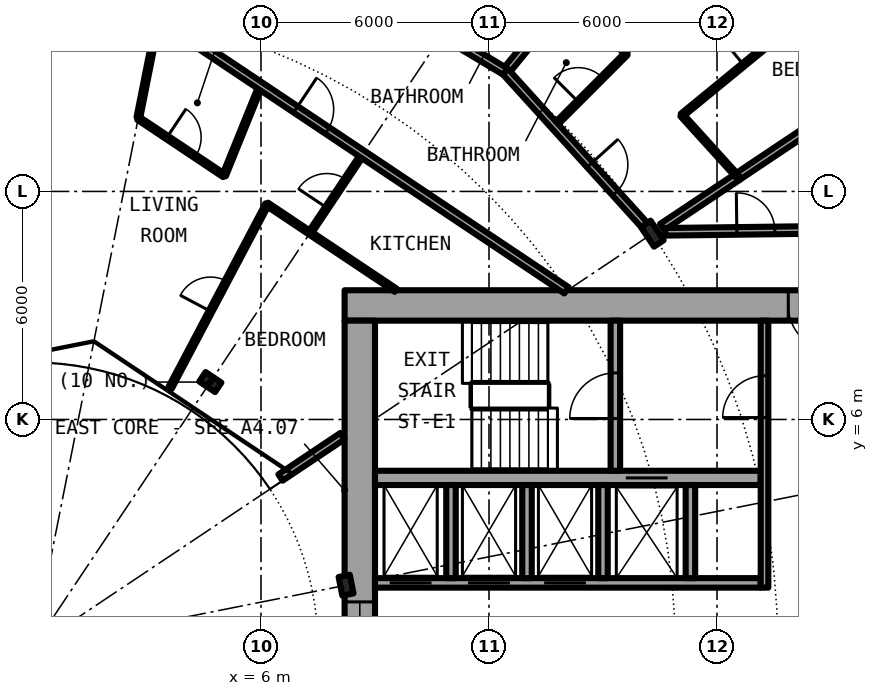
"""IFC4 building model, lengths in metres.
Left out: names, types, materials, properties, quantities, classifications, styles, units other than length and angle.
Written with IfcOpenShell. Run it as: python <this file> out.ifc"""

import sys

from ifc_helpers import new_model, si_unit, direction, frame, frame_2d, origin, origin_2d, place, context, subcontext, project, spatial, rectangle, i_section, extrude, element, fill, save


model = new_model("IFC4")
c1 = context("Model", 3, precision=1e-05, world=origin(), true_north=direction((0.0, 1.0)))
c2 = subcontext(c1, "Body", "Model", "MODEL_VIEW")
j1 = project(units=[si_unit("LENGTHUNIT", "METRE"), si_unit("PLANEANGLEUNIT", "RADIAN")], contexts=[c1])
p1 = place(None, origin())
s1 = spatial("IfcSite", under=j1, at=p1, CompositionType="ELEMENT")
p2 = place(p1, origin())
s2 = spatial("IfcBuilding", under=s1, at=p2, CompositionType="ELEMENT")
p3 = place(p2, frame((0.0, 0.0, 28.9)))
s3 = spatial("IfcBuildingStorey", under=s2, at=p3, CompositionType="ELEMENT", Elevation=28.9)
p4 = place(p3, frame((16.297, 10.889, 0.0), z_axis=(0.0, 0.0, 1.0), x_axis=(0.831469612303, 0.55557023302, 0.0)))
e1 = element("IfcColumn", 1, at=p4, inside=s3, PredefinedType="COLUMN", context=c2, shape_type="SweptSolid", body=[
    extrude(i_section(OverallWidth=0.305, OverallDepth=0.62, WebThickness=0.021, FlangeThickness=0.04, FilletRadius=0.027, at=origin_2d()), origin(), (0.0, 0.0, 1.0), 3.05),
])
for number, where, z_axis, x_axis in (
    (2, (8.239, 1.639, 0.0), (0.0, 0.0, 1.0), (0.981, 0.195, 0.0)),
    (3, (4.667, 6.984, 0.0), (0.0, 0.0, 1.0), (0.556, 0.831, 0.0)),
):
    element("IfcColumn", number, at=place(p3, frame(where, z_axis=z_axis, x_axis=x_axis)), inside=s3, PredefinedType="COLUMN", context=c2, shape_type="SweptSolid", body=[
        extrude(i_section(OverallWidth=0.3, OverallDepth=0.5, WebThickness=0.014, FlangeThickness=0.028, FilletRadius=0.027, at=origin_2d()), origin(), (0.0, 0.0, 1.0), 3.05),
    ])
p5 = place(p3, frame((22.699, 15.167, 0.0), z_axis=(0.0, 0.0, 1.0), x_axis=(-0.634382322723, 0.773019449054, 0.0)))
e4 = element("IfcWall", 4, at=p5, inside=s3, PredefinedType="SOLIDWALL", context=c2, shape_type="SweptSolid", body=[
    extrude(rectangle(XDim=5.352, YDim=0.25, at=frame_2d((2.676, 0.0))), origin(), (0.0, 0.0, 1.0), 2.7),
])
p6 = place(p5, frame((0.441, 0.0, 0.3)))
e5 = element("IfcOpeningElement", 5, at=p6, cuts=e4, PredefinedType="OPENING", context=c2, shape_type="SweptSolid", body=[
    extrude(rectangle(XDim=1.8, YDim=2.1, at=frame_2d((0.9, 1.05))), frame((0.0, 0.135, 0.0), z_axis=(0.0, -1.0, 0.0), x_axis=(1.0, 0.0, 0.0)), (0.0, 0.0, 1.0), 0.27),
])
p7 = place(p5, frame((3.51, 0.0, 0.0)))
e6 = element("IfcOpeningElement", 6, at=p7, cuts=e4, PredefinedType="OPENING", context=c2, shape_type="SweptSolid", body=[
    extrude(rectangle(XDim=1.0, YDim=2.2, at=frame_2d((0.5, 1.1))), frame((0.0, 0.135, 0.0), z_axis=(0.0, -1.0, 0.0), x_axis=(1.0, 0.0, 0.0)), (0.0, 0.0, 1.0), 0.27),
])
p8 = place(p3, frame((22.4, 9.0, 0.0), z_axis=(0.0, 0.0, 1.0), x_axis=(-1.0, 0.0, 0.0)))
e7 = element("IfcWall", 7, at=p8, inside=s3, PredefinedType="SHEAR", context=c2, shape_type="SweptSolid", body=[
    extrude(rectangle(XDim=14.2, YDim=0.8, at=frame_2d((7.1, 0.0))), origin(), (0.0, 0.0, 1.0), 3.05),
])
p9 = place(p8, frame((1.325, 0.0, 0.0)))
e8 = element("IfcOpeningElement", 8, at=p9, cuts=e7, PredefinedType="OPENING", context=c2, shape_type="SweptSolid", body=[
    extrude(rectangle(XDim=1.2, YDim=2.3, at=frame_2d((0.6, 1.15))), frame((0.0, 0.41, 0.0), z_axis=(0.0, -1.0, 0.0), x_axis=(1.0, 0.0, 0.0)), (0.0, 0.0, 1.0), 0.82),
])
p10 = place(p3, frame((8.6, -8.6, 0.0), z_axis=(0.0, 0.0, 1.0), x_axis=(0.0, 1.0, 0.0)))
e9 = element("IfcWall", 9, at=p10, inside=s3, PredefinedType="SHEAR", context=c2, shape_type="SweptSolid", body=[
    extrude(rectangle(XDim=17.2, YDim=0.8, at=frame_2d((8.6, 0.0))), origin(), (0.0, 0.0, 1.0), 3.05),
])
p11 = place(p10, frame((7.4, 0.0, 0.1)))
e10 = element("IfcOpeningElement", 10, at=p11, cuts=e9, PredefinedType="OPENING", context=c2, shape_type="SweptSolid", body=[
    extrude(rectangle(XDim=2.4, YDim=2.2, at=frame_2d((1.2, 1.1))), frame((0.0, 0.41, 0.0), z_axis=(0.0, -1.0, 0.0), x_axis=(1.0, 0.0, 0.0)), (0.0, 0.0, 1.0), 0.82),
])
p12 = place(p3, frame((9.0, 1.7, 0.0), z_axis=(0.0, 0.0, 1.0), x_axis=(1.0, 0.0, 0.0)))
e11 = element("IfcWall", 11, at=p12, inside=s3, PredefinedType="SHEAR", context=c2, shape_type="SweptSolid", body=[
    extrude(rectangle(XDim=10.15, YDim=0.25, at=frame_2d((5.075, 0.0))), origin(), (0.0, 0.0, 1.0), 3.05),
])
p13 = place(p12, frame((0.387, 0.0, 0.0)))
e12 = element("IfcOpeningElement", 12, at=p13, cuts=e11, PredefinedType="OPENING", context=c2, shape_type="SweptSolid", body=[
    extrude(rectangle(XDim=1.1, YDim=2.3, at=frame_2d((0.55, 1.15))), frame((0.0, 0.135, 0.0), z_axis=(0.0, -1.0, 0.0), x_axis=(1.0, 0.0, 0.0)), (0.0, 0.0, 1.0), 0.27),
])
p14 = place(p12, frame((2.45, 0.0, 0.0)))
e13 = element("IfcOpeningElement", 13, at=p14, cuts=e11, PredefinedType="OPENING", context=c2, shape_type="SweptSolid", body=[
    extrude(rectangle(XDim=1.1, YDim=2.3, at=frame_2d((0.55, 1.15))), frame((0.0, 0.135, 0.0), z_axis=(0.0, -1.0, 0.0), x_axis=(1.0, 0.0, 0.0)), (0.0, 0.0, 1.0), 0.27),
])
p15 = place(p12, frame((4.45, 0.0, 0.0)))
e14 = element("IfcOpeningElement", 14, at=p15, cuts=e11, PredefinedType="OPENING", context=c2, shape_type="SweptSolid", body=[
    extrude(rectangle(XDim=1.1, YDim=2.3, at=frame_2d((0.55, 1.15))), frame((0.0, 0.135, 0.0), z_axis=(0.0, -1.0, 0.0), x_axis=(1.0, 0.0, 0.0)), (0.0, 0.0, 1.0), 0.27),
])
p16 = place(p3, frame((9.0, 4.462, 0.0), z_axis=(0.0, 0.0, 1.0), x_axis=(1.0, 0.0, 0.0)))
e15 = element("IfcWall", 15, at=p16, inside=s3, PredefinedType="SHEAR", context=c2, shape_type="SweptSolid", body=[
    extrude(rectangle(XDim=10.15, YDim=0.375, at=frame_2d((5.075, 0.0))), origin(), (0.0, 0.0, 1.0), 3.05),
])
p17 = place(p16, frame((6.6, 0.0, 0.0)))
e16 = element("IfcOpeningElement", 16, at=p17, cuts=e15, PredefinedType="OPENING", context=c2, shape_type="SweptSolid", body=[
    extrude(rectangle(XDim=1.1, YDim=2.3, at=frame_2d((0.55, 1.15))), frame((0.0, 0.198, 0.0), z_axis=(0.0, -1.0, 0.0), x_axis=(1.0, 0.0, 0.0)), (0.0, 0.0, 1.0), 0.395),
])
p18 = place(p3, frame((15.325, 4.65, 0.0), z_axis=(0.0, 0.0, 1.0), x_axis=(0.0, 1.0, 0.0)))
e17 = element("IfcWall", 17, at=p18, inside=s3, PredefinedType="SHEAR", context=c2, shape_type="SweptSolid", body=[
    extrude(rectangle(XDim=3.95, YDim=0.25, at=frame_2d((1.975, 0.0))), origin(), (0.0, 0.0, 1.0), 3.05),
])
p19 = place(p18, frame((1.375, 0.0, 0.0)))
e18 = element("IfcOpeningElement", 18, at=p19, cuts=e17, PredefinedType="OPENING", context=c2, shape_type="SweptSolid", body=[
    extrude(rectangle(XDim=1.2, YDim=2.3, at=frame_2d((0.6, 1.15))), frame((0.0, 0.135, 0.0), z_axis=(0.0, -1.0, 0.0), x_axis=(1.0, 0.0, 0.0)), (0.0, 0.0, 1.0), 0.27),
])
for number, where, z_axis, x_axis in (
    (19, (15.0, 1.825, 0.0), (0.0, 0.0, 1.0), (0.0, 1.0, 0.0)),
    (20, (17.3, 1.825, 0.0), (0.0, 0.0, 1.0), (0.0, 1.0, 0.0)),
):
    element("IfcWall", number, at=place(p3, frame(where, z_axis=z_axis, x_axis=x_axis)), inside=s3, PredefinedType="SOLIDWALL", context=c2, shape_type="SweptSolid", body=[
        extrude(rectangle(XDim=2.45, YDim=0.25, at=frame_2d((1.225, 0.0))), origin(), (0.0, 0.0, 1.0), 2.7),
    ])
p20 = place(p3, frame((19.25, 1.575, 0.0), z_axis=(0.0, 0.0, 1.0), x_axis=(0.0, 1.0, 0.0)))
e21 = element("IfcWall", 21, at=p20, inside=s3, PredefinedType="SOLIDWALL", context=c2, shape_type="SweptSolid", body=[
    extrude(rectangle(XDim=7.025, YDim=0.2, at=frame_2d((3.513, 0.0))), origin(), (0.0, 0.0, 1.0), 2.7),
])
p21 = place(p20, frame((4.475, 0.0, 0.0)))
e22 = element("IfcOpeningElement", 22, at=p21, cuts=e21, PredefinedType="OPENING", context=c2, shape_type="SweptSolid", body=[
    extrude(rectangle(XDim=1.1, YDim=2.3, at=frame_2d((0.55, 1.15))), frame((0.0, 0.11, 0.0), z_axis=(0.0, -1.0, 0.0), x_axis=(1.0, 0.0, 0.0)), (0.0, 0.0, 1.0), 0.22),
])
for number, where, z_axis, x_axis in (
    (23, (11.0, 1.825, 0.0), (0.0, 0.0, 1.0), (0.0, 1.0, 0.0)),
    (24, (13.0, 1.825, 0.0), (0.0, 0.0, 1.0), (0.0, 1.0, 0.0)),
):
    element("IfcWall", number, at=place(p3, frame(where, z_axis=z_axis, x_axis=x_axis)), inside=s3, PredefinedType="SOLIDWALL", context=c2, shape_type="SweptSolid", body=[
        extrude(rectangle(XDim=2.45, YDim=0.25, at=frame_2d((1.225, 0.0))), origin(), (0.0, 0.0, 1.0), 2.7),
    ])
p22 = place(p3, frame((3.606, 6.827, 0.0), z_axis=(0.0, 0.0, 1.0), x_axis=(0.466976820365, 0.884269556889, 0.0)))
e25 = element("IfcWall", 25, at=p22, inside=s3, PredefinedType="PARTITIONING", context=c2, shape_type="SweptSolid", body=[
    extrude(rectangle(XDim=5.469, YDim=0.1, at=frame_2d((2.735, 0.0))), origin(), (0.0, 0.0, 1.0), 2.7),
])
p23 = place(p22, frame((2.284, 0.0, 0.0)))
e26 = element("IfcOpeningElement", 26, at=p23, cuts=e25, PredefinedType="OPENING", context=c2, shape_type="SweptSolid", body=[
    extrude(rectangle(XDim=0.9, YDim=2.3, at=frame_2d((0.45, 1.15))), frame((0.0, 0.06, 0.0), z_axis=(0.0, -1.0, 0.0), x_axis=(1.0, 0.0, 0.0)), (0.0, 0.0, 1.0), 0.12),
])
p24 = place(p3, frame((5.029, 12.418, 0.0), z_axis=(0.0, 0.0, 1.0), x_axis=(0.375649498413, 0.926761811008, 0.0)))
e27 = element("IfcWall", 27, at=p24, inside=s3, PredefinedType="PARTITIONING", context=c2, shape_type="SweptSolid", body=[
    extrude(rectangle(XDim=2.548, YDim=0.1, at=frame_2d((1.274, 0.0))), origin(), (0.0, 0.0, 1.0), 2.7),
])
p25 = place(p3, frame((7.289, 10.908, 0.0), z_axis=(0.0, 0.0, 1.0), x_axis=(0.555355163998, 0.831613276602, 0.0)))
e28 = element("IfcWall", 28, at=p25, inside=s3, PredefinedType="PARTITIONING", context=c2, shape_type="SweptSolid", body=[
    extrude(rectangle(XDim=2.494, YDim=0.1, at=frame_2d((1.247, 0.0))), origin(), (0.0, 0.0, 1.0), 2.7),
])
p26 = place(p25, frame((0.797, 0.0, 0.0)))
e29 = element("IfcOpeningElement", 29, at=p26, cuts=e28, PredefinedType="OPENING", context=c2, shape_type="SweptSolid", body=[
    extrude(rectangle(XDim=0.9, YDim=2.3, at=frame_2d((0.45, 1.15))), frame((0.0, 0.06, 0.0), z_axis=(0.0, -1.0, 0.0), x_axis=(1.0, 0.0, 0.0)), (0.0, 0.0, 1.0), 0.12),
])
p27 = place(p3, frame((12.434, 15.151, 0.0), z_axis=(0.0, 0.0, 1.0), x_axis=(0.634381303318, 0.773020285633, 0.0)))
e30 = element("IfcWall", 30, at=p27, inside=s3, PredefinedType="PARTITIONING", context=c2, shape_type="SweptSolid", body=[
    extrude(rectangle(XDim=7.576, YDim=0.2, at=frame_2d((3.788, 0.0))), origin(), (0.0, 0.0, 1.0), 2.7),
])
p28 = place(p3, frame((13.722, 13.73, 0.0), z_axis=(0.0, 0.0, 1.0), x_axis=(0.706741540154, 0.707471833659, 0.0)))
e31 = element("IfcWall", 31, at=p28, inside=s3, PredefinedType="PARTITIONING", context=c2, shape_type="SweptSolid", body=[
    extrude(rectangle(XDim=2.674, YDim=0.1, at=frame_2d((1.337, 0.0))), origin(), (0.0, 0.0, 1.0), 2.7),
])
p29 = place(p28, frame((0.887, 0.0, 0.0)))
e32 = element("IfcOpeningElement", 32, at=p29, cuts=e31, PredefinedType="OPENING", context=c2, shape_type="SweptSolid", body=[
    extrude(rectangle(XDim=0.9, YDim=2.3, at=frame_2d((0.45, 1.15))), frame((0.0, 0.06, 0.0), z_axis=(0.0, -1.0, 0.0), x_axis=(1.0, 0.0, 0.0)), (0.0, 0.0, 1.0), 0.12),
])
p30 = place(p3, frame((17.077, 14.006, 0.0), z_axis=(0.0, 0.0, 1.0), x_axis=(0.77326214499, 0.634086472908, 0.0)))
e33 = element("IfcWall", 33, at=p30, inside=s3, PredefinedType="PARTITIONING", context=c2, shape_type="SweptSolid", body=[
    extrude(rectangle(XDim=5.089, YDim=0.1, at=frame_2d((2.544, 0.0))), origin(), (0.0, 0.0, 1.0), 2.7),
])
p31 = place(p30, frame((2.094, 0.0, 0.0)))
e34 = element("IfcOpeningElement", 34, at=p31, cuts=e33, PredefinedType="OPENING", context=c2, shape_type="SweptSolid", body=[
    extrude(rectangle(XDim=0.9, YDim=2.3, at=frame_2d((0.45, 1.15))), frame((0.0, 0.06, 0.0), z_axis=(0.0, -1.0, 0.0), x_axis=(1.0, 0.0, 0.0)), (0.0, 0.0, 1.0), 0.12),
])
p32 = place(p3, frame((18.542, 12.389, 0.0), z_axis=(0.0, 0.0, 1.0), x_axis=(0.831387096605, 0.55569370664, 0.0)))
e35 = element("IfcWall", 35, at=p32, inside=s3, PredefinedType="PARTITIONING", context=c2, shape_type="SweptSolid", body=[
    extrude(rectangle(XDim=4.875, YDim=0.2, at=frame_2d((2.438, 0.0))), origin(), (0.0, 0.0, 1.0), 2.7),
])
p33 = place(p3, frame((16.555, 11.061, 0.0), z_axis=(0.0, 0.0, 1.0), x_axis=(0.832066006555, 0.554676627176, 0.0)))
e36 = element("IfcWall", 36, at=p33, inside=s3, PredefinedType="PARTITIONING", context=c2, shape_type="SweptSolid", body=[
    extrude(rectangle(XDim=2.39, YDim=0.2, at=frame_2d((1.195, 0.0))), origin(), (0.0, 0.0, 1.0), 2.7),
])
p34 = place(p3, frame((6.513, 4.472, 0.0), z_axis=(0.0, 0.0, 1.0), x_axis=(0.831417956244, 0.555647533996, 0.0)))
e37 = element("IfcWall", 37, at=p34, inside=s3, PredefinedType="PARTITIONING", context=c2, shape_type="SweptSolid", body=[
    extrude(rectangle(XDim=1.962, YDim=0.2, at=frame_2d((0.981, 0.0))), origin(), (0.0, 0.0, 1.0), 2.7),
])
p35 = place(p3, frame((16.637, 10.938, 0.0), z_axis=(0.0, 0.0, 1.0), x_axis=(0.99992425795, 0.012307654658, 0.0)))
e38 = element("IfcWall", 38, at=p35, inside=s3, PredefinedType="PARTITIONING", context=c2, shape_type="SweptSolid", body=[
    extrude(rectangle(XDim=5.039, YDim=0.2, at=frame_2d((2.519, 0.0))), origin(), (0.0, 0.0, 1.0), 2.7),
])
p36 = place(p35, frame((1.884, 0.0, 0.0)))
e39 = element("IfcOpeningElement", 39, at=p36, cuts=e38, PredefinedType="OPENING", context=c2, shape_type="SweptSolid", body=[
    extrude(rectangle(XDim=1.0, YDim=2.3, at=frame_2d((0.5, 1.15))), frame((0.0, 0.11, 0.0), z_axis=(0.0, -1.0, 0.0), x_axis=(1.0, 0.0, 0.0)), (0.0, 0.0, 1.0), 0.22),
])
p37 = place(p3, frame((2.771, 13.926, 0.0), z_axis=(0.0, 0.0, 1.0), x_axis=(0.831538390496, -0.555467285384, 0.0)))
e40 = element("IfcWall", 40, at=p37, inside=s3, PredefinedType="PARTITIONING", context=c2, shape_type="SweptSolid", body=[
    extrude(rectangle(XDim=2.717, YDim=0.1, at=frame_2d((1.358, 0.0))), origin(), (0.0, 0.0, 1.0), 2.7),
])
p38 = place(p37, frame((0.907, 0.0, 0.0)))
e41 = element("IfcOpeningElement", 41, at=p38, cuts=e40, PredefinedType="OPENING", context=c2, shape_type="SweptSolid", body=[
    extrude(rectangle(XDim=0.9, YDim=2.3, at=frame_2d((0.45, 1.15))), frame((0.0, 0.06, 0.0), z_axis=(0.0, -1.0, 0.0), x_axis=(1.0, 0.0, 0.0)), (0.0, 0.0, 1.0), 0.12),
])
p39 = place(p3, frame((6.159, 11.663, 0.0), z_axis=(0.0, 0.0, 1.0), x_axis=(0.831459707426, -0.555585056429, 0.0)))
e42 = element("IfcWall", 42, at=p39, inside=s3, PredefinedType="PARTITIONING", context=c2, shape_type="SweptSolid", body=[
    extrude(rectangle(XDim=4.073, YDim=0.1, at=frame_2d((2.037, 0.0))), origin(), (0.0, 0.0, 1.0), 2.7),
])
p40 = place(p3, frame((3.299, 16.574, 0.0), z_axis=(0.0, 0.0, 1.0), x_axis=(0.831465254975, -0.555576754166, 0.0)))
e43 = element("IfcWall", 43, at=p40, inside=s3, PredefinedType="PARTITIONING", context=c2, shape_type="SweptSolid", body=[
    extrude(rectangle(XDim=12.915, YDim=0.2, at=frame_2d((6.457, 0.0))), origin(), (0.0, 0.0, 1.0), 2.7),
])
p41 = place(p40, frame((4.346, 0.0, 0.0)))
e44 = element("IfcOpeningElement", 44, at=p41, cuts=e43, PredefinedType="OPENING", context=c2, shape_type="SweptSolid", body=[
    extrude(rectangle(XDim=1.0, YDim=2.3, at=frame_2d((0.5, 1.15))), frame((0.0, 0.11, 0.0), z_axis=(0.0, -1.0, 0.0), x_axis=(1.0, 0.0, 0.0)), (0.0, 0.0, 1.0), 0.22),
])
p42 = place(p3, frame((10.915, 16.061, 0.0), z_axis=(0.0, 0.0, 1.0), x_axis=(0.857809047014, -0.513968519329, 0.0)))
e45 = element("IfcWall", 45, at=p42, inside=s3, PredefinedType="PARTITIONING", context=c2, shape_type="SweptSolid", body=[
    extrude(rectangle(XDim=1.771, YDim=0.2, at=frame_2d((0.885, 0.0))), origin(), (0.0, 0.0, 1.0), 2.38),
])
p43 = place(p3, frame((12.434, 15.151, 0.0), z_axis=(0.0, 0.0, 1.0), x_axis=(0.671514934772, -0.740991020444, 0.0)))
e46 = element("IfcWall", 46, at=p43, inside=s3, PredefinedType="PARTITIONING", context=c2, shape_type="SweptSolid", body=[
    extrude(rectangle(XDim=5.598, YDim=0.2, at=frame_2d((2.799, 0.0))), origin(), (0.0, 0.0, 1.0), 2.38),
])
p44 = place(p43, frame((3.305, 0.0, 0.0)))
e47 = element("IfcOpeningElement", 47, at=p44, cuts=e46, PredefinedType="OPENING", context=c2, shape_type="SweptSolid", body=[
    extrude(rectangle(XDim=1.0, YDim=2.3, at=frame_2d((0.5, 1.15))), frame((0.0, 0.11, 0.0), z_axis=(0.0, -1.0, 0.0), x_axis=(1.0, 0.0, 0.0)), (0.0, 0.0, 1.0), 0.22),
])
p45 = place(p3, frame((14.147, 17.238, 0.0), z_axis=(0.0, 0.0, 1.0), x_axis=(0.671674967707, -0.740845960882, 0.0)))
e48 = element("IfcWall", 48, at=p45, inside=s3, PredefinedType="PARTITIONING", context=c2, shape_type="SweptSolid", body=[
    extrude(rectangle(XDim=2.181, YDim=0.1, at=frame_2d((1.091, 0.0))), origin(), (0.0, 0.0, 1.0), 2.7),
])
p46 = place(p3, frame((17.072, 14.011, 0.0), z_axis=(0.0, 0.0, 1.0), x_axis=(0.67169789574, -0.740825172937, 0.0)))
e49 = element("IfcWall", 49, at=p46, inside=s3, PredefinedType="PARTITIONING", context=c2, shape_type="SweptSolid", body=[
    extrude(rectangle(XDim=2.183, YDim=0.1, at=frame_2d((1.091, 0.0))), origin(), (0.0, 0.0, 1.0), 2.7),
])
p47 = place(p3, frame((2.774, 13.948, 0.0), z_axis=(0.0, 0.0, 1.0), x_axis=(0.195338620417, 0.980735858105, 0.0)))
e50 = element("IfcWall", 50, at=p47, inside=s3, PredefinedType="PARTITIONING", context=c2, shape_type="SweptSolid", body=[
    extrude(rectangle(XDim=2.657, YDim=0.1, at=frame_2d((1.329, 0.0))), origin(), (0.0, 0.0, 1.0), 2.7),
])
p48 = place(p13, origin())
e51 = element("IfcDoor", 51, at=p48, inside=s3, OperationType="DOUBLE_DOOR_SLIDING", PredefinedType="DOOR", context=c2, shape_type="SweptSolid", body=[
    extrude(rectangle(XDim=1.1, YDim=2.3, at=frame_2d((0.55, 1.15))), frame((0.0, 0.025, 0.0), z_axis=(0.0, -1.0, 0.0), x_axis=(1.0, 0.0, 0.0)), (0.0, 0.0, 1.0), 0.05),
])
fill(e12, e51)
p49 = place(p14, origin())
e52 = element("IfcDoor", 52, at=p49, inside=s3, OperationType="DOUBLE_DOOR_SLIDING", PredefinedType="DOOR", context=c2, shape_type="SweptSolid", body=[
    extrude(rectangle(XDim=1.1, YDim=2.3, at=frame_2d((0.55, 1.15))), frame((0.0, 0.025, 0.0), z_axis=(0.0, -1.0, 0.0), x_axis=(1.0, 0.0, 0.0)), (0.0, 0.0, 1.0), 0.05),
])
fill(e13, e52)
p50 = place(p15, origin())
e53 = element("IfcDoor", 53, at=p50, inside=s3, OperationType="DOUBLE_DOOR_SLIDING", PredefinedType="DOOR", context=c2, shape_type="SweptSolid", body=[
    extrude(rectangle(XDim=1.1, YDim=2.3, at=frame_2d((0.55, 1.15))), frame((0.0, 0.025, 0.0), z_axis=(0.0, -1.0, 0.0), x_axis=(1.0, 0.0, 0.0)), (0.0, 0.0, 1.0), 0.05),
])
fill(e14, e53)
p51 = place(p17, origin())
e54 = element("IfcDoor", 54, at=p51, inside=s3, OperationType="DOUBLE_DOOR_SLIDING", PredefinedType="DOOR", context=c2, shape_type="SweptSolid", body=[
    extrude(rectangle(XDim=1.1, YDim=2.3, at=frame_2d((0.55, 1.15))), frame((0.0, 0.025, 0.0), z_axis=(0.0, -1.0, 0.0), x_axis=(1.0, 0.0, 0.0)), (0.0, 0.0, 1.0), 0.05),
])
fill(e16, e54)
p52 = place(p19, origin())
e55 = element("IfcDoor", 55, at=p52, inside=s3, OperationType="SINGLE_SWING_LEFT", PredefinedType="DOOR", context=c2, shape_type="SweptSolid", body=[
    extrude(rectangle(XDim=1.2, YDim=2.3, at=frame_2d((0.6, 1.15))), frame((0.0, 0.025, 0.0), z_axis=(0.0, -1.0, 0.0), x_axis=(1.0, 0.0, 0.0)), (0.0, 0.0, 1.0), 0.05),
])
fill(e18, e55)
p53 = place(p21, origin())
e56 = element("IfcDoor", 56, at=p53, inside=s3, OperationType="SINGLE_SWING_LEFT", PredefinedType="DOOR", context=c2, shape_type="SweptSolid", body=[
    extrude(rectangle(XDim=1.1, YDim=2.3, at=frame_2d((0.55, 1.15))), frame((0.0, 0.025, 0.0), z_axis=(0.0, -1.0, 0.0), x_axis=(1.0, 0.0, 0.0)), (0.0, 0.0, 1.0), 0.05),
])
fill(e22, e56)
p54 = place(p9, origin())
e57 = element("IfcDoor", 57, at=p54, inside=s3, OperationType="SINGLE_SWING_RIGHT", PredefinedType="DOOR", context=c2, shape_type="SweptSolid", body=[
    extrude(rectangle(XDim=1.2, YDim=2.3, at=frame_2d((0.6, 1.15))), frame((0.0, 0.025, 0.0), z_axis=(0.0, -1.0, 0.0), x_axis=(1.0, 0.0, 0.0)), (0.0, 0.0, 1.0), 0.05),
])
fill(e8, e57)
p55 = place(p11, origin())
e58 = element("IfcWindow", 58, at=p55, inside=s3, PartitioningType="SINGLE_PANEL", PredefinedType="WINDOW", context=c2, shape_type="SweptSolid", body=[
    extrude(rectangle(XDim=2.4, YDim=2.2, at=frame_2d((1.2, 1.1))), frame((0.0, 0.03, 0.0), z_axis=(0.0, -1.0, 0.0), x_axis=(1.0, 0.0, 0.0)), (0.0, 0.0, 1.0), 0.06),
])
fill(e10, e58)
p56 = place(p44, origin())
e59 = element("IfcDoor", 59, at=p56, inside=s3, OperationType="SINGLE_SWING_RIGHT", PredefinedType="DOOR", context=c2, shape_type="SweptSolid", body=[
    extrude(rectangle(XDim=1.0, YDim=2.3, at=frame_2d((0.5, 1.15))), frame((0.0, 0.025, 0.0), z_axis=(0.0, -1.0, 0.0), x_axis=(1.0, 0.0, 0.0)), (0.0, 0.0, 1.0), 0.05),
])
fill(e47, e59)
p57 = place(p29, origin())
e60 = element("IfcDoor", 60, at=p57, inside=s3, OperationType="SINGLE_SWING_RIGHT", PredefinedType="DOOR", context=c2, shape_type="SweptSolid", body=[
    extrude(rectangle(XDim=0.9, YDim=2.3, at=frame_2d((0.45, 1.15))), frame((0.0, 0.025, 0.0), z_axis=(0.0, -1.0, 0.0), x_axis=(1.0, 0.0, 0.0)), (0.0, 0.0, 1.0), 0.05),
])
fill(e32, e60)
p58 = place(p31, origin())
e61 = element("IfcDoor", 61, at=p58, inside=s3, OperationType="SINGLE_SWING_RIGHT", PredefinedType="DOOR", context=c2, shape_type="SweptSolid", body=[
    extrude(rectangle(XDim=0.9, YDim=2.3, at=frame_2d((0.45, 1.15))), frame((0.0, 0.025, 0.0), z_axis=(0.0, -1.0, 0.0), x_axis=(1.0, 0.0, 0.0)), (0.0, 0.0, 1.0), 0.05),
])
fill(e34, e61)
p59 = place(p41, origin())
e62 = element("IfcDoor", 62, at=p59, inside=s3, OperationType="SINGLE_SWING_LEFT", PredefinedType="DOOR", context=c2, shape_type="SweptSolid", body=[
    extrude(rectangle(XDim=1.0, YDim=2.3, at=frame_2d((0.5, 1.15))), frame((0.0, 0.025, 0.0), z_axis=(0.0, -1.0, 0.0), x_axis=(1.0, 0.0, 0.0)), (0.0, 0.0, 1.0), 0.05),
])
fill(e44, e62)
p60 = place(p38, origin())
e63 = element("IfcDoor", 63, at=p60, inside=s3, OperationType="SINGLE_SWING_LEFT", PredefinedType="DOOR", context=c2, shape_type="SweptSolid", body=[
    extrude(rectangle(XDim=0.9, YDim=2.3, at=frame_2d((0.45, 1.15))), frame((0.0, 0.025, 0.0), z_axis=(0.0, -1.0, 0.0), x_axis=(1.0, 0.0, 0.0)), (0.0, 0.0, 1.0), 0.05),
])
fill(e41, e63)
p61 = place(p26, origin())
e64 = element("IfcDoor", 64, at=p61, inside=s3, OperationType="SINGLE_SWING_RIGHT", PredefinedType="DOOR", context=c2, shape_type="SweptSolid", body=[
    extrude(rectangle(XDim=0.9, YDim=2.3, at=frame_2d((0.45, 1.15))), frame((0.0, 0.025, 0.0), z_axis=(0.0, -1.0, 0.0), x_axis=(1.0, 0.0, 0.0)), (0.0, 0.0, 1.0), 0.05),
])
fill(e29, e64)
p62 = place(p23, origin())
e65 = element("IfcDoor", 65, at=p62, inside=s3, OperationType="SINGLE_SWING_LEFT", PredefinedType="DOOR", context=c2, shape_type="SweptSolid", body=[
    extrude(rectangle(XDim=0.9, YDim=2.3, at=frame_2d((0.45, 1.15))), frame((0.0, 0.025, 0.0), z_axis=(0.0, -1.0, 0.0), x_axis=(1.0, 0.0, 0.0)), (0.0, 0.0, 1.0), 0.05),
])
fill(e26, e65)
p63 = place(p36, origin())
e66 = element("IfcDoor", 66, at=p63, inside=s3, OperationType="SINGLE_SWING_LEFT", PredefinedType="DOOR", context=c2, shape_type="SweptSolid", body=[
    extrude(rectangle(XDim=1.0, YDim=2.3, at=frame_2d((0.5, 1.15))), frame((0.0, 0.025, 0.0), z_axis=(0.0, -1.0, 0.0), x_axis=(1.0, 0.0, 0.0)), (0.0, 0.0, 1.0), 0.05),
])
fill(e39, e66)
save(model, sys.argv[1])
